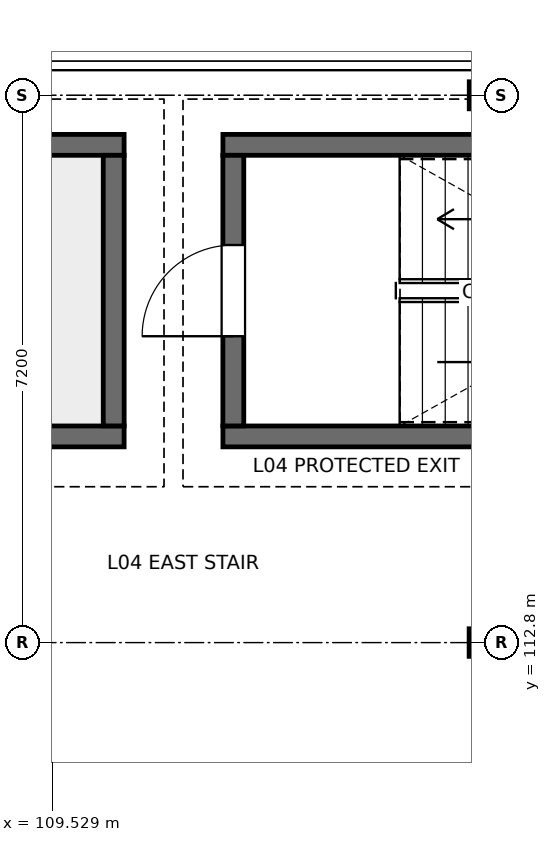
"""IFC4 building model, lengths in metres.
Left out: names, types, materials, properties, quantities, classifications, styles, units other than length and angle.
Written with IfcOpenShell. Run it as: python <this file> out.ifc"""

import sys

from ifc_helpers import new_model, si_unit, direction, frame, frame_2d, origin, origin_2d, place, context, subcontext, project, spatial, rectangle, i_section, extrude, element, fill, save


model = new_model("IFC4")
c1 = context("Model", 3, precision=1e-05, world=origin(), true_north=direction((0.0, 1.0)))
c2 = subcontext(c1, "Body", "Model", "MODEL_VIEW")
j1 = project(units=[si_unit("LENGTHUNIT", "METRE"), si_unit("PLANEANGLEUNIT", "RADIAN")], contexts=[c1])
p1 = place(None, origin())
s1 = spatial("IfcSite", under=j1, at=p1, CompositionType="ELEMENT")
p2 = place(p1, origin())
s2 = spatial("IfcBuilding", under=s1, at=p2, CompositionType="ELEMENT")
p3 = place(p2, frame((0.0, 0.0, 17.1)))
s3 = spatial("IfcBuildingStorey", under=s2, at=p3, CompositionType="ELEMENT", Elevation=17.1)
p4 = place(p3, frame((115.2, 112.8, 0.0), z_axis=(0.0, 0.0, 1.0), x_axis=(1.0, 0.0, 0.0)))
e1 = element("IfcColumn", 1, at=p4, inside=s3, PredefinedType="COLUMN", context=c2, shape_type="SweptSolid", body=[
    extrude(i_section(OverallWidth=0.371, OverallDepth=0.363, WebThickness=0.013, FlangeThickness=0.022, FilletRadius=0.015, at=origin_2d()), origin(), (0.0, 0.0, 1.0), 3.9),
])
p5 = place(p3, frame((115.2, 120.0, 0.0), z_axis=(0.0, 0.0, 1.0), x_axis=(1.0, 0.0, 0.0)))
e2 = element("IfcColumn", 2, at=p5, inside=s3, PredefinedType="COLUMN", context=c2, shape_type="SweptSolid", body=[
    extrude(i_section(OverallWidth=0.368, OverallDepth=0.356, WebThickness=0.011, FlangeThickness=0.018, FilletRadius=0.015, at=origin_2d()), origin(), (0.0, 0.0, 1.0), 3.9),
])
for number, where, z_axis, x_axis in (
    (3, (110.475, 115.512, 0.0), (0.0, 0.0, 1.0), (-1.0, 0.0, 0.0)),
    (4, (101.575, 119.348, 0.0), (0.0, 0.0, 1.0), (1.0, 0.0, 0.0)),
):
    element("IfcWall", number, at=place(p3, frame(where, z_axis=z_axis, x_axis=x_axis)), inside=s3, PredefinedType="SOLIDWALL", context=c2, shape_type="SweptSolid", body=[
        extrude(rectangle(XDim=8.9, YDim=0.275, at=frame_2d((4.45, 0.0))), origin(), (0.0, 0.0, 1.0), 3.64),
    ])
p6 = place(p3, frame((110.338, 119.21, 0.0), z_axis=(0.0, 0.0, 1.0), x_axis=(0.0, -1.0, 0.0)))
e5 = element("IfcWall", 5, at=p6, inside=s3, PredefinedType="SOLIDWALL", context=c2, shape_type="SweptSolid", body=[
    extrude(rectangle(XDim=3.56, YDim=0.275, at=frame_2d((1.78, 0.0))), origin(), (0.0, 0.0, 1.0), 3.64),
])
for number, where, z_axis, x_axis in (
    (6, (120.725, 115.512, 0.0), (0.0, 0.0, 1.0), (-1.0, 0.0, 0.0)),
    (7, (111.775, 119.348, 0.0), (0.0, 0.0, 1.0), (1.0, 0.0, 0.0)),
):
    element("IfcWall", number, at=place(p3, frame(where, z_axis=z_axis, x_axis=x_axis)), inside=s3, PredefinedType="SOLIDWALL", context=c2, shape_type="SweptSolid", body=[
        extrude(rectangle(XDim=8.95, YDim=0.275, at=frame_2d((4.475, 0.0))), origin(), (0.0, 0.0, 1.0), 3.64),
    ])
p7 = place(p3, frame((111.912, 115.65, 0.0), z_axis=(0.0, 0.0, 1.0), x_axis=(0.0, 1.0, 0.0)))
e8 = element("IfcWall", 8, at=p7, inside=s3, PredefinedType="SOLIDWALL", context=c2, shape_type="SweptSolid", body=[
    extrude(rectangle(XDim=3.56, YDim=0.275, at=frame_2d((1.78, 0.0))), origin(), (0.0, 0.0, 1.0), 3.64),
])
p8 = place(p7, frame((1.18, 0.0, 0.0)))
e9 = element("IfcOpeningElement", 9, at=p8, cuts=e8, PredefinedType="OPENING", context=c2, shape_type="SweptSolid", body=[
    extrude(rectangle(XDim=1.2, YDim=2.2, at=frame_2d((0.6, 1.1))), frame((0.0, 0.147, 0.0), z_axis=(0.0, -1.0, 0.0), x_axis=(1.0, 0.0, 0.0)), (0.0, 0.0, 1.0), 0.295),
])
p9 = place(p8, origin())
e10 = element("IfcDoor", 10, at=p9, inside=s3, OperationType="SINGLE_SWING_LEFT", PredefinedType="DOOR", context=c2, shape_type="SweptSolid", body=[
    extrude(rectangle(XDim=1.2, YDim=2.2, at=frame_2d((0.6, 1.1))), frame((0.0, 0.025, 0.0), z_axis=(0.0, -1.0, 0.0), x_axis=(1.0, 0.0, 0.0)), (0.0, 0.0, 1.0), 0.05),
])
fill(e9, e10)
save(model, sys.argv[1])
